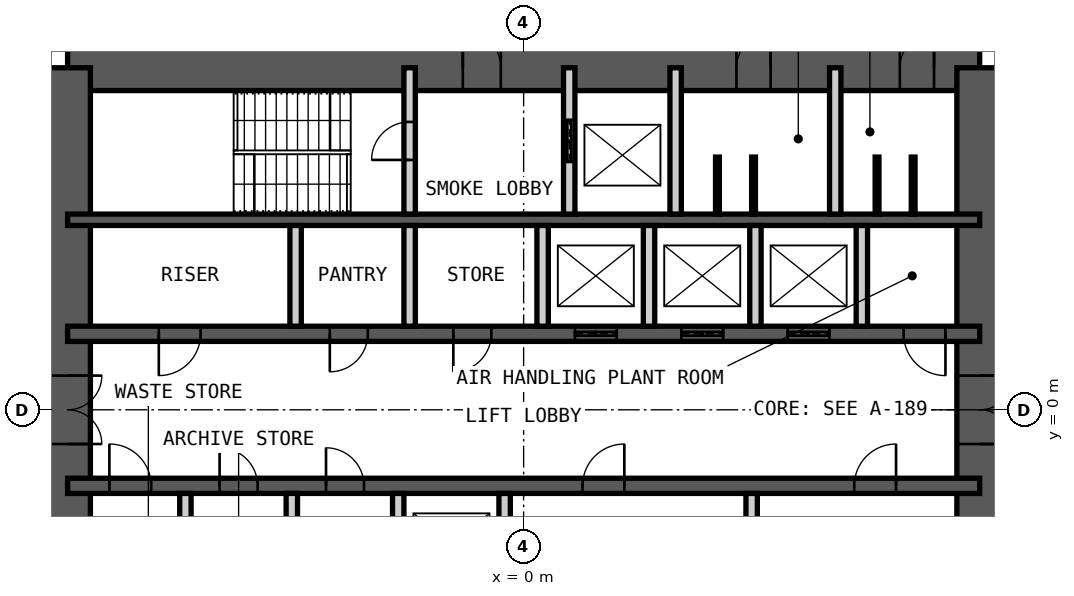
"""IFC4 building model, lengths in metres.
Left out: names, types, materials, properties, quantities, classifications, styles, units other than length and angle.
Written with IfcOpenShell. Run it as: python <this file> out.ifc"""

import sys

from ifc_helpers import new_model, si_unit, direction, frame, frame_2d, origin, place, context, subcontext, project, spatial, rectangle, extrude, element, fill, save


model = new_model("IFC4")
c1 = context("Model", 3, precision=1e-05, world=origin(), true_north=direction((0.0, 1.0)))
c2 = subcontext(c1, "Body", "Model", "MODEL_VIEW")
j1 = project(units=[si_unit("LENGTHUNIT", "METRE"), si_unit("PLANEANGLEUNIT", "RADIAN")], contexts=[c1])
p1 = place(None, origin())
s1 = spatial("IfcSite", under=j1, at=p1, CompositionType="ELEMENT")
p2 = place(p1, origin())
s2 = spatial("IfcBuilding", under=s1, at=p2, CompositionType="ELEMENT")
p3 = place(p2, frame((0.0, 0.0, 214.0)))
s3 = spatial("IfcBuildingStorey", under=s2, at=p3, CompositionType="ELEMENT", Elevation=214.0)
p4 = place(p3, frame((-12.0, 9.0, 0.0), z_axis=(0.0, 0.0, 1.0), x_axis=(1.0, 0.0, 0.0)))
e1 = element("IfcWall", 1, at=p4, inside=s3, PredefinedType="SHEAR", context=c2, shape_type="SweptSolid", body=[
    extrude(rectangle(XDim=24.0, YDim=1.2, at=frame_2d((12.0, 0.0))), origin(), (0.0, 0.0, 1.0), 4.2),
])
p5 = place(p4, frame((10.4, 0.0, 0.0)))
e2 = element("IfcOpeningElement", 2, at=p5, cuts=e1, PredefinedType="OPENING", context=c2, shape_type="SweptSolid", body=[
    extrude(rectangle(XDim=1.0, YDim=2.1, at=frame_2d((0.5, 1.05))), frame((0.0, 0.61, 0.0), z_axis=(0.0, -1.0, 0.0), x_axis=(1.0, 0.0, 0.0)), (0.0, 0.0, 1.0), 1.22),
])
p6 = place(p4, frame((17.6, 0.0, 0.0)))
e3 = element("IfcOpeningElement", 3, at=p6, cuts=e1, PredefinedType="OPENING", context=c2, shape_type="SweptSolid", body=[
    extrude(rectangle(XDim=0.9, YDim=2.1, at=frame_2d((0.45, 1.05))), frame((0.0, 0.61, 0.0), z_axis=(0.0, -1.0, 0.0), x_axis=(1.0, 0.0, 0.0)), (0.0, 0.0, 1.0), 1.22),
])
p7 = place(p4, frame((21.9, 0.0, 0.0)))
e4 = element("IfcOpeningElement", 4, at=p7, cuts=e1, PredefinedType="OPENING", context=c2, shape_type="SweptSolid", body=[
    extrude(rectangle(XDim=0.9, YDim=2.1, at=frame_2d((0.45, 1.05))), frame((0.0, 0.61, 0.0), z_axis=(0.0, -1.0, 0.0), x_axis=(1.0, 0.0, 0.0)), (0.0, 0.0, 1.0), 1.22),
])
p8 = place(p3, frame((12.0, -9.0, 0.0), z_axis=(0.0, 0.0, 1.0), x_axis=(0.0, 1.0, 0.0)))
e5 = element("IfcWall", 5, at=p8, inside=s3, PredefinedType="SHEAR", context=c2, shape_type="SweptSolid", body=[
    extrude(rectangle(XDim=18.0, YDim=1.2, at=frame_2d((9.0, 0.0))), origin(), (0.0, 0.0, 1.0), 4.2),
])
p9 = place(p8, frame((8.1, 0.0, 0.0)))
e6 = element("IfcOpeningElement", 6, at=p9, cuts=e5, PredefinedType="OPENING", context=c2, shape_type="SweptSolid", body=[
    extrude(rectangle(XDim=1.8, YDim=2.1, at=frame_2d((0.9, 1.05))), frame((0.0, 0.61, 0.0), z_axis=(0.0, -1.0, 0.0), x_axis=(1.0, 0.0, 0.0)), (0.0, 0.0, 1.0), 1.22),
])
p10 = place(p3, frame((-12.0, -9.0, 0.0), z_axis=(0.0, 0.0, 1.0), x_axis=(0.0, 1.0, 0.0)))
e7 = element("IfcWall", 7, at=p10, inside=s3, PredefinedType="SHEAR", context=c2, shape_type="SweptSolid", body=[
    extrude(rectangle(XDim=18.0, YDim=1.2, at=frame_2d((9.0, 0.0))), origin(), (0.0, 0.0, 1.0), 4.2),
])
p11 = place(p10, frame((8.1, 0.0, 0.0)))
e8 = element("IfcOpeningElement", 8, at=p11, cuts=e7, PredefinedType="OPENING", context=c2, shape_type="SweptSolid", body=[
    extrude(rectangle(XDim=1.8, YDim=2.1, at=frame_2d((0.9, 1.05))), frame((0.0, 0.61, 0.0), z_axis=(0.0, -1.0, 0.0), x_axis=(1.0, 0.0, 0.0)), (0.0, 0.0, 1.0), 1.22),
])
p12 = place(p3, frame((-12.0, 5.0, 0.0), z_axis=(0.0, 0.0, 1.0), x_axis=(1.0, 0.0, 0.0)))
e9 = element("IfcWall", 9, at=p12, inside=s3, PredefinedType="SHEAR", context=c2, shape_type="SweptSolid", body=[
    extrude(rectangle(XDim=24.0, YDim=0.3, at=frame_2d((12.0, 0.0))), origin(), (0.0, 0.0, 1.0), 4.2),
])
p13 = place(p3, frame((-12.0, 2.0, 0.0), z_axis=(0.0, 0.0, 1.0), x_axis=(1.0, 0.0, 0.0)))
e10 = element("IfcWall", 10, at=p13, inside=s3, PredefinedType="SHEAR", context=c2, shape_type="SweptSolid", body=[
    extrude(rectangle(XDim=24.0, YDim=0.4, at=frame_2d((12.0, 0.0))), origin(), (0.0, 0.0, 1.0), 4.2),
])
p14 = place(p13, frame((2.4, 0.0, 0.0)))
e11 = element("IfcOpeningElement", 11, at=p14, cuts=e10, PredefinedType="OPENING", context=c2, shape_type="SweptSolid", body=[
    extrude(rectangle(XDim=1.1, YDim=2.1, at=frame_2d((0.55, 1.05))), frame((0.0, 0.21, 0.0), z_axis=(0.0, -1.0, 0.0), x_axis=(1.0, 0.0, 0.0)), (0.0, 0.0, 1.0), 0.42),
])
p15 = place(p13, frame((22.0, 0.0, 0.0)))
e12 = element("IfcOpeningElement", 12, at=p15, cuts=e10, PredefinedType="OPENING", context=c2, shape_type="SweptSolid", body=[
    extrude(rectangle(XDim=1.1, YDim=2.1, at=frame_2d((0.55, 1.05))), frame((0.0, 0.21, 0.0), z_axis=(0.0, -1.0, 0.0), x_axis=(1.0, 0.0, 0.0)), (0.0, 0.0, 1.0), 0.42),
])
p16 = place(p13, frame((10.15, 0.0, 0.0)))
e13 = element("IfcOpeningElement", 13, at=p16, cuts=e10, PredefinedType="OPENING", context=c2, shape_type="SweptSolid", body=[
    extrude(rectangle(XDim=1.0, YDim=2.1, at=frame_2d((0.5, 1.05))), frame((0.0, 0.21, 0.0), z_axis=(0.0, -1.0, 0.0), x_axis=(1.0, 0.0, 0.0)), (0.0, 0.0, 1.0), 0.42),
])
p17 = place(p13, frame((6.9, 0.0, 0.0)))
e14 = element("IfcOpeningElement", 14, at=p17, cuts=e10, PredefinedType="OPENING", context=c2, shape_type="SweptSolid", body=[
    extrude(rectangle(XDim=1.0, YDim=2.1, at=frame_2d((0.5, 1.05))), frame((0.0, 0.21, 0.0), z_axis=(0.0, -1.0, 0.0), x_axis=(1.0, 0.0, 0.0)), (0.0, 0.0, 1.0), 0.42),
])
p18 = place(p13, frame((13.35, 0.0, 0.0)))
e15 = element("IfcOpeningElement", 15, at=p18, cuts=e10, PredefinedType="OPENING", context=c2, shape_type="SweptSolid", body=[
    extrude(rectangle(XDim=1.1, YDim=2.4, at=frame_2d((0.55, 1.2))), frame((0.0, 0.21, 0.0), z_axis=(0.0, -1.0, 0.0), x_axis=(1.0, 0.0, 0.0)), (0.0, 0.0, 1.0), 0.42),
])
p19 = place(p13, frame((16.15, 0.0, 0.0)))
e16 = element("IfcOpeningElement", 16, at=p19, cuts=e10, PredefinedType="OPENING", context=c2, shape_type="SweptSolid", body=[
    extrude(rectangle(XDim=1.1, YDim=2.4, at=frame_2d((0.55, 1.2))), frame((0.0, 0.21, 0.0), z_axis=(0.0, -1.0, 0.0), x_axis=(1.0, 0.0, 0.0)), (0.0, 0.0, 1.0), 0.42),
])
p20 = place(p13, frame((18.95, 0.0, 0.0)))
e17 = element("IfcOpeningElement", 17, at=p20, cuts=e10, PredefinedType="OPENING", context=c2, shape_type="SweptSolid", body=[
    extrude(rectangle(XDim=1.1, YDim=2.4, at=frame_2d((0.55, 1.2))), frame((0.0, 0.21, 0.0), z_axis=(0.0, -1.0, 0.0), x_axis=(1.0, 0.0, 0.0)), (0.0, 0.0, 1.0), 0.42),
])
p21 = place(p3, frame((-12.0, -2.0, 0.0), z_axis=(0.0, 0.0, 1.0), x_axis=(1.0, 0.0, 0.0)))
e18 = element("IfcWall", 18, at=p21, inside=s3, PredefinedType="SHEAR", context=c2, shape_type="SweptSolid", body=[
    extrude(rectangle(XDim=24.0, YDim=0.4, at=frame_2d((12.0, 0.0))), origin(), (0.0, 0.0, 1.0), 4.2),
])
p22 = place(p21, frame((1.1, 0.0, 0.0)))
e19 = element("IfcOpeningElement", 19, at=p22, cuts=e18, PredefinedType="OPENING", context=c2, shape_type="SweptSolid", body=[
    extrude(rectangle(XDim=1.1, YDim=2.1, at=frame_2d((0.55, 1.05))), frame((0.0, 0.21, 0.0), z_axis=(0.0, -1.0, 0.0), x_axis=(1.0, 0.0, 0.0)), (0.0, 0.0, 1.0), 0.42),
])
p23 = place(p21, frame((13.55, 0.0, 0.0)))
e20 = element("IfcOpeningElement", 20, at=p23, cuts=e18, PredefinedType="OPENING", context=c2, shape_type="SweptSolid", body=[
    extrude(rectangle(XDim=1.1, YDim=2.1, at=frame_2d((0.55, 1.05))), frame((0.0, 0.21, 0.0), z_axis=(0.0, -1.0, 0.0), x_axis=(1.0, 0.0, 0.0)), (0.0, 0.0, 1.0), 0.42),
])
p24 = place(p21, frame((20.7, 0.0, 0.0)))
e21 = element("IfcOpeningElement", 21, at=p24, cuts=e18, PredefinedType="OPENING", context=c2, shape_type="SweptSolid", body=[
    extrude(rectangle(XDim=1.1, YDim=2.1, at=frame_2d((0.55, 1.05))), frame((0.0, 0.21, 0.0), z_axis=(0.0, -1.0, 0.0), x_axis=(1.0, 0.0, 0.0)), (0.0, 0.0, 1.0), 0.42),
])
p25 = place(p21, frame((4.0, 0.0, 0.0)))
e22 = element("IfcOpeningElement", 22, at=p25, cuts=e18, PredefinedType="OPENING", context=c2, shape_type="SweptSolid", body=[
    extrude(rectangle(XDim=1.0, YDim=2.1, at=frame_2d((0.5, 1.05))), frame((0.0, 0.21, 0.0), z_axis=(0.0, -1.0, 0.0), x_axis=(1.0, 0.0, 0.0)), (0.0, 0.0, 1.0), 0.42),
])
p26 = place(p21, frame((6.8, 0.0, 0.0)))
e23 = element("IfcOpeningElement", 23, at=p26, cuts=e18, PredefinedType="OPENING", context=c2, shape_type="SweptSolid", body=[
    extrude(rectangle(XDim=1.0, YDim=2.1, at=frame_2d((0.5, 1.05))), frame((0.0, 0.21, 0.0), z_axis=(0.0, -1.0, 0.0), x_axis=(1.0, 0.0, 0.0)), (0.0, 0.0, 1.0), 0.42),
])
p27 = place(p3, frame((-3.0, 5.15, 0.0), z_axis=(0.0, 0.0, 1.0), x_axis=(0.0, 1.0, 0.0)))
e24 = element("IfcWall", 24, at=p27, inside=s3, PredefinedType="PARTITIONING", context=c2, shape_type="SweptSolid", body=[
    extrude(rectangle(XDim=3.85, YDim=0.3, at=frame_2d((1.925, 0.0))), origin(), (0.0, 0.0, 1.0), 3.98),
])
p28 = place(p27, frame((1.425, 0.0, 0.0)))
e25 = element("IfcOpeningElement", 25, at=p28, cuts=e24, PredefinedType="OPENING", context=c2, shape_type="SweptSolid", body=[
    extrude(rectangle(XDim=1.0, YDim=2.1, at=frame_2d((0.5, 1.05))), frame((0.0, 0.16, 0.0), z_axis=(0.0, -1.0, 0.0), x_axis=(1.0, 0.0, 0.0)), (0.0, 0.0, 1.0), 0.32),
])
p29 = place(p3, frame((1.2, 5.15, 0.0), z_axis=(0.0, 0.0, 1.0), x_axis=(0.0, 1.0, 0.0)))
e26 = element("IfcWall", 26, at=p29, inside=s3, PredefinedType="PARTITIONING", context=c2, shape_type="SweptSolid", body=[
    extrude(rectangle(XDim=3.85, YDim=0.3, at=frame_2d((1.925, 0.0))), origin(), (0.0, 0.0, 1.0), 3.98),
])
p30 = place(p29, frame((1.375, 0.0, 0.0)))
e27 = element("IfcOpeningElement", 27, at=p30, cuts=e26, PredefinedType="OPENING", context=c2, shape_type="SweptSolid", body=[
    extrude(rectangle(XDim=1.1, YDim=2.4, at=frame_2d((0.55, 1.2))), frame((0.0, 0.16, 0.0), z_axis=(0.0, -1.0, 0.0), x_axis=(1.0, 0.0, 0.0)), (0.0, 0.0, 1.0), 0.32),
])
for number, where, z_axis, x_axis in (
    (28, (4.0, 5.15, 0.0), (0.0, 0.0, 1.0), (0.0, 1.0, 0.0)),
    (29, (8.2, 5.15, 0.0), (0.0, 0.0, 1.0), (0.0, 1.0, 0.0)),
):
    element("IfcWall", number, at=place(p3, frame(where, z_axis=z_axis, x_axis=x_axis)), inside=s3, PredefinedType="PARTITIONING", context=c2, shape_type="SweptSolid", body=[
        extrude(rectangle(XDim=3.85, YDim=0.3, at=frame_2d((1.925, 0.0))), origin(), (0.0, 0.0, 1.0), 3.98),
    ])
for number, where, z_axis, x_axis in (
    (30, (-6.0, 2.2, 0.0), (0.0, 0.0, 1.0), (0.0, 1.0, 0.0)),
    (31, (-3.0, 2.2, 0.0), (0.0, 0.0, 1.0), (0.0, 1.0, 0.0)),
    (32, (0.5, 2.2, 0.0), (0.0, 0.0, 1.0), (0.0, 1.0, 0.0)),
    (33, (3.3, 2.2, 0.0), (0.0, 0.0, 1.0), (0.0, 1.0, 0.0)),
    (34, (6.1, 2.2, 0.0), (0.0, 0.0, 1.0), (0.0, 1.0, 0.0)),
    (35, (8.9, 2.2, 0.0), (0.0, 0.0, 1.0), (0.0, 1.0, 0.0)),
    (36, (-8.9, -4.85, 0.0), (0.0, 0.0, 1.0), (0.0, 1.0, 0.0)),
    (37, (-6.1, -4.85, 0.0), (0.0, 0.0, 1.0), (0.0, 1.0, 0.0)),
    (38, (-3.3, -4.85, 0.0), (0.0, 0.0, 1.0), (0.0, 1.0, 0.0)),
    (39, (-0.5, -4.85, 0.0), (0.0, 0.0, 1.0), (0.0, 1.0, 0.0)),
    (40, (6.0, -4.85, 0.0), (0.0, 0.0, 1.0), (0.0, 1.0, 0.0)),
):
    element("IfcWall", number, at=place(p3, frame(where, z_axis=z_axis, x_axis=x_axis)), inside=s3, PredefinedType="PARTITIONING", context=c2, shape_type="SweptSolid", body=[
        extrude(rectangle(XDim=2.65, YDim=0.3, at=frame_2d((1.325, 0.0))), origin(), (0.0, 0.0, 1.0), 3.98),
    ])
for number, where, z_axis, x_axis in (
    (41, (5.1, 5.15, 0.0), (0.0, 0.0, 1.0), (0.0, 1.0, 0.0)),
    (42, (6.05, 5.15, 0.0), (0.0, 0.0, 1.0), (0.0, 1.0, 0.0)),
    (43, (9.3, 5.15, 0.0), (0.0, 0.0, 1.0), (0.0, 1.0, 0.0)),
    (44, (10.25, 5.15, 0.0), (0.0, 0.0, 1.0), (0.0, 1.0, 0.0)),
):
    element("IfcWall", number, at=place(p3, frame(where, z_axis=z_axis, x_axis=x_axis)), inside=s3, PredefinedType="PARTITIONING", context=c2, shape_type="SweptSolid", body=[
        extrude(rectangle(XDim=1.5, YDim=0.1, at=frame_2d((0.75, 0.0))), origin(), (0.0, 0.0, 1.0), 2.1),
    ])
p31 = place(p5, origin())
e45 = element("IfcDoor", 45, at=p31, inside=s3, OperationType="SINGLE_SWING_RIGHT", PredefinedType="DOOR", context=c2, shape_type="SweptSolid", body=[
    extrude(rectangle(XDim=1.0, YDim=2.1, at=frame_2d((0.5, 1.05))), frame((0.0, 0.025, 0.0), z_axis=(0.0, -1.0, 0.0), x_axis=(1.0, 0.0, 0.0)), (0.0, 0.0, 1.0), 0.05),
])
fill(e2, e45)
p32 = place(p6, origin())
e46 = element("IfcDoor", 46, at=p32, inside=s3, OperationType="SINGLE_SWING_LEFT", PredefinedType="DOOR", context=c2, shape_type="SweptSolid", body=[
    extrude(rectangle(XDim=0.9, YDim=2.1, at=frame_2d((0.45, 1.05))), frame((0.0, 0.025, 0.0), z_axis=(0.0, -1.0, 0.0), x_axis=(1.0, 0.0, 0.0)), (0.0, 0.0, 1.0), 0.05),
])
fill(e3, e46)
p33 = place(p7, origin())
e47 = element("IfcDoor", 47, at=p33, inside=s3, OperationType="SINGLE_SWING_LEFT", PredefinedType="DOOR", context=c2, shape_type="SweptSolid", body=[
    extrude(rectangle(XDim=0.9, YDim=2.1, at=frame_2d((0.45, 1.05))), frame((0.0, 0.025, 0.0), z_axis=(0.0, -1.0, 0.0), x_axis=(1.0, 0.0, 0.0)), (0.0, 0.0, 1.0), 0.05),
])
fill(e4, e47)
p34 = place(p28, origin())
e48 = element("IfcDoor", 48, at=p34, inside=s3, OperationType="SINGLE_SWING_RIGHT", PredefinedType="DOOR", context=c2, shape_type="SweptSolid", body=[
    extrude(rectangle(XDim=1.0, YDim=2.1, at=frame_2d((0.5, 1.05))), frame((0.0, 0.025, 0.0), z_axis=(0.0, -1.0, 0.0), x_axis=(1.0, 0.0, 0.0)), (0.0, 0.0, 1.0), 0.05),
])
fill(e25, e48)
p35 = place(p14, origin())
e49 = element("IfcDoor", 49, at=p35, inside=s3, OperationType="SINGLE_SWING_LEFT", PredefinedType="DOOR", context=c2, shape_type="SweptSolid", body=[
    extrude(rectangle(XDim=1.1, YDim=2.1, at=frame_2d((0.55, 1.05))), frame((0.0, 0.025, 0.0), z_axis=(0.0, -1.0, 0.0), x_axis=(1.0, 0.0, 0.0)), (0.0, 0.0, 1.0), 0.05),
])
fill(e11, e49)
p36 = place(p22, origin())
e50 = element("IfcDoor", 50, at=p36, inside=s3, OperationType="SINGLE_SWING_RIGHT", PredefinedType="DOOR", context=c2, shape_type="SweptSolid", body=[
    extrude(rectangle(XDim=1.1, YDim=2.1, at=frame_2d((0.55, 1.05))), frame((0.0, 0.025, 0.0), z_axis=(0.0, -1.0, 0.0), x_axis=(1.0, 0.0, 0.0)), (0.0, 0.0, 1.0), 0.05),
])
fill(e19, e50)
p37 = place(p15, origin())
e51 = element("IfcDoor", 51, at=p37, inside=s3, OperationType="SINGLE_SWING_RIGHT", PredefinedType="DOOR", context=c2, shape_type="SweptSolid", body=[
    extrude(rectangle(XDim=1.1, YDim=2.1, at=frame_2d((0.55, 1.05))), frame((0.0, 0.025, 0.0), z_axis=(0.0, -1.0, 0.0), x_axis=(1.0, 0.0, 0.0)), (0.0, 0.0, 1.0), 0.05),
])
fill(e12, e51)
p38 = place(p16, origin())
e52 = element("IfcDoor", 52, at=p38, inside=s3, OperationType="SINGLE_SWING_LEFT", PredefinedType="DOOR", context=c2, shape_type="SweptSolid", body=[
    extrude(rectangle(XDim=1.0, YDim=2.1, at=frame_2d((0.5, 1.05))), frame((0.0, 0.025, 0.0), z_axis=(0.0, -1.0, 0.0), x_axis=(1.0, 0.0, 0.0)), (0.0, 0.0, 1.0), 0.05),
])
fill(e13, e52)
p39 = place(p23, origin())
e53 = element("IfcDoor", 53, at=p39, inside=s3, OperationType="SINGLE_SWING_LEFT", PredefinedType="DOOR", context=c2, shape_type="SweptSolid", body=[
    extrude(rectangle(XDim=1.1, YDim=2.1, at=frame_2d((0.55, 1.05))), frame((0.0, 0.025, 0.0), z_axis=(0.0, -1.0, 0.0), x_axis=(1.0, 0.0, 0.0)), (0.0, 0.0, 1.0), 0.05),
])
fill(e20, e53)
p40 = place(p24, origin())
e54 = element("IfcDoor", 54, at=p40, inside=s3, OperationType="SINGLE_SWING_LEFT", PredefinedType="DOOR", context=c2, shape_type="SweptSolid", body=[
    extrude(rectangle(XDim=1.1, YDim=2.1, at=frame_2d((0.55, 1.05))), frame((0.0, 0.025, 0.0), z_axis=(0.0, -1.0, 0.0), x_axis=(1.0, 0.0, 0.0)), (0.0, 0.0, 1.0), 0.05),
])
fill(e21, e54)
p41 = place(p9, origin())
e55 = element("IfcDoor", 55, at=p41, inside=s3, OperationType="DOUBLE_DOOR_DOUBLE_SWING", PredefinedType="DOOR", context=c2, shape_type="SweptSolid", body=[
    extrude(rectangle(XDim=1.8, YDim=2.1, at=frame_2d((0.9, 1.05))), frame((0.0, 0.025, 0.0), z_axis=(0.0, -1.0, 0.0), x_axis=(1.0, 0.0, 0.0)), (0.0, 0.0, 1.0), 0.05),
])
fill(e6, e55)
p42 = place(p11, origin())
e56 = element("IfcDoor", 56, at=p42, inside=s3, OperationType="DOUBLE_DOOR_DOUBLE_SWING", PredefinedType="DOOR", context=c2, shape_type="SweptSolid", body=[
    extrude(rectangle(XDim=1.8, YDim=2.1, at=frame_2d((0.9, 1.05))), frame((0.0, 0.025, 0.0), z_axis=(0.0, -1.0, 0.0), x_axis=(1.0, 0.0, 0.0)), (0.0, 0.0, 1.0), 0.05),
])
fill(e8, e56)
p43 = place(p30, origin())
e57 = element("IfcDoor", 57, at=p43, inside=s3, OperationType="DOUBLE_DOOR_SLIDING", PredefinedType="DOOR", context=c2, shape_type="SweptSolid", body=[
    extrude(rectangle(XDim=1.1, YDim=2.4, at=frame_2d((0.55, 1.2))), frame((0.0, 0.025, 0.0), z_axis=(0.0, -1.0, 0.0), x_axis=(1.0, 0.0, 0.0)), (0.0, 0.0, 1.0), 0.05),
])
fill(e27, e57)
p44 = place(p17, origin())
e58 = element("IfcDoor", 58, at=p44, inside=s3, OperationType="SINGLE_SWING_LEFT", PredefinedType="DOOR", context=c2, shape_type="SweptSolid", body=[
    extrude(rectangle(XDim=1.0, YDim=2.1, at=frame_2d((0.5, 1.05))), frame((0.0, 0.025, 0.0), z_axis=(0.0, -1.0, 0.0), x_axis=(1.0, 0.0, 0.0)), (0.0, 0.0, 1.0), 0.05),
])
fill(e14, e58)
p45 = place(p18, origin())
e59 = element("IfcDoor", 59, at=p45, inside=s3, OperationType="DOUBLE_DOOR_SLIDING", PredefinedType="DOOR", context=c2, shape_type="SweptSolid", body=[
    extrude(rectangle(XDim=1.1, YDim=2.4, at=frame_2d((0.55, 1.2))), frame((0.0, 0.025, 0.0), z_axis=(0.0, -1.0, 0.0), x_axis=(1.0, 0.0, 0.0)), (0.0, 0.0, 1.0), 0.05),
])
fill(e15, e59)
p46 = place(p19, origin())
e60 = element("IfcDoor", 60, at=p46, inside=s3, OperationType="DOUBLE_DOOR_SLIDING", PredefinedType="DOOR", context=c2, shape_type="SweptSolid", body=[
    extrude(rectangle(XDim=1.1, YDim=2.4, at=frame_2d((0.55, 1.2))), frame((0.0, 0.025, 0.0), z_axis=(0.0, -1.0, 0.0), x_axis=(1.0, 0.0, 0.0)), (0.0, 0.0, 1.0), 0.05),
])
fill(e16, e60)
p47 = place(p20, origin())
e61 = element("IfcDoor", 61, at=p47, inside=s3, OperationType="DOUBLE_DOOR_SLIDING", PredefinedType="DOOR", context=c2, shape_type="SweptSolid", body=[
    extrude(rectangle(XDim=1.1, YDim=2.4, at=frame_2d((0.55, 1.2))), frame((0.0, 0.025, 0.0), z_axis=(0.0, -1.0, 0.0), x_axis=(1.0, 0.0, 0.0)), (0.0, 0.0, 1.0), 0.05),
])
fill(e17, e61)
p48 = place(p25, origin())
e62 = element("IfcDoor", 62, at=p48, inside=s3, OperationType="SINGLE_SWING_RIGHT", PredefinedType="DOOR", context=c2, shape_type="SweptSolid", body=[
    extrude(rectangle(XDim=1.0, YDim=2.1, at=frame_2d((0.5, 1.05))), frame((0.0, 0.025, 0.0), z_axis=(0.0, -1.0, 0.0), x_axis=(1.0, 0.0, 0.0)), (0.0, 0.0, 1.0), 0.05),
])
fill(e22, e62)
p49 = place(p26, origin())
e63 = element("IfcDoor", 63, at=p49, inside=s3, OperationType="SINGLE_SWING_RIGHT", PredefinedType="DOOR", context=c2, shape_type="SweptSolid", body=[
    extrude(rectangle(XDim=1.0, YDim=2.1, at=frame_2d((0.5, 1.05))), frame((0.0, 0.025, 0.0), z_axis=(0.0, -1.0, 0.0), x_axis=(1.0, 0.0, 0.0)), (0.0, 0.0, 1.0), 0.05),
])
fill(e23, e63)
save(model, sys.argv[1])
